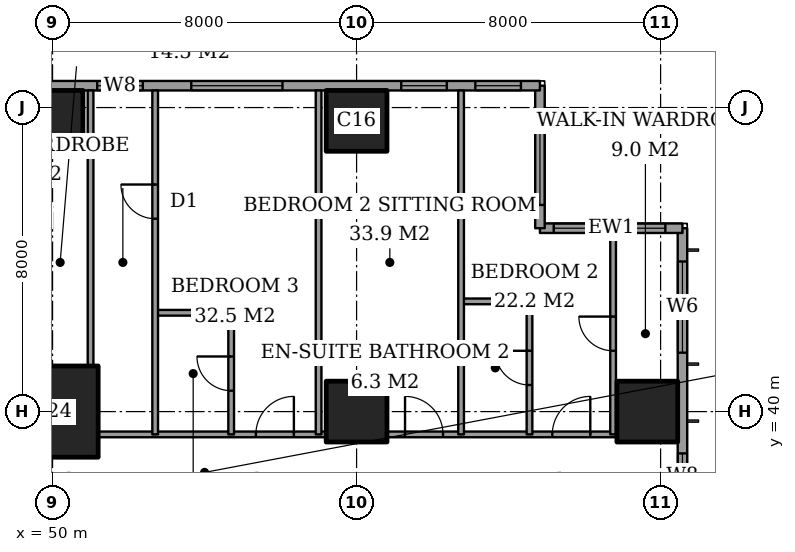
"""IFC4 building model, lengths in metres.
Left out: names, types, materials, properties, quantities, classifications, styles, units other than length and angle.
Written with IfcOpenShell. Run it as: python <this file> out.ifc"""

import sys

from ifc_helpers import new_model, si_unit, direction, frame, frame_2d, origin, origin_2d, place, context, subcontext, project, spatial, rectangle, extrude, element, fill, save


model = new_model("IFC4")
c1 = context("Model", 3, precision=1e-05, world=origin(), true_north=direction((0.0, 1.0)))
c2 = subcontext(c1, "Body", "Model", "MODEL_VIEW")
j1 = project(units=[si_unit("LENGTHUNIT", "METRE"), si_unit("PLANEANGLEUNIT", "RADIAN")], contexts=[c1])
p1 = place(None, origin())
s1 = spatial("IfcSite", under=j1, at=p1, CompositionType="ELEMENT")
p2 = place(p1, origin())
s2 = spatial("IfcBuilding", under=s1, at=p2, CompositionType="ELEMENT")
p3 = place(p2, frame((0.0, 0.0, 255.6)))
s3 = spatial("IfcBuildingStorey", under=s2, at=p3, CompositionType="ELEMENT", Elevation=255.6)
p4 = place(p3, frame((50.0, 40.0, 0.0), z_axis=(0.0, 0.0, 1.0), x_axis=(1.0, 0.0, 0.0)))
e1 = element("IfcColumn", 1, at=p4, inside=s3, PredefinedType="COLUMN", context=c2, shape_type="SweptSolid", body=[
    extrude(rectangle(XDim=2.4, YDim=2.4, at=origin_2d()), origin(), (0.0, 0.0, 1.0), 3.6),
])
for number, where, z_axis, x_axis in (
    (2, (50.0, 47.65, 0.0), (0.0, 0.0, 1.0), (1.0, 0.0, 0.0)),
    (3, (58.0, 40.0, 0.0), (0.0, 0.0, 1.0), (1.0, 0.0, 0.0)),
    (4, (58.0, 47.65, 0.0), (0.0, 0.0, 1.0), (1.0, 0.0, 0.0)),
    (5, (65.65, 40.0, 0.0), (0.0, 0.0, 1.0), (1.0, 0.0, 0.0)),
):
    element("IfcColumn", number, at=place(p3, frame(where, z_axis=z_axis, x_axis=x_axis)), inside=s3, PredefinedType="COLUMN", context=c2, shape_type="SweptSolid", body=[
        extrude(rectangle(XDim=1.6, YDim=1.6, at=origin_2d()), origin(), (0.0, 0.0, 1.0), 3.6),
    ])
p5 = place(p3, frame((66.575, 3.175, 0.0), z_axis=(0.0, 0.0, 1.0), x_axis=(0.0, 1.0, 0.0)))
e6 = element("IfcWall", 6, at=p5, inside=s3, PredefinedType="SOLIDWALL", context=c2, shape_type="SweptSolid", body=[
    extrude(rectangle(XDim=41.65, YDim=0.25, at=frame_2d((20.825, 0.0))), origin(), (0.0, 0.0, 1.0), 3.6),
])
p6 = place(p5, frame((0.875, 0.0, 0.6)))
e7 = element("IfcOpeningElement", 7, at=p6, cuts=e6, PredefinedType="OPENING", context=c2, shape_type="SweptSolid", body=[
    extrude(rectangle(XDim=2.4, YDim=2.0, at=frame_2d((1.2, 1.0))), frame((0.0, 0.135, 0.0), z_axis=(0.0, -1.0, 0.0), x_axis=(1.0, 0.0, 0.0)), (0.0, 0.0, 1.0), 0.27),
])
p7 = place(p5, frame((6.6, 0.0, 0.6)))
e8 = element("IfcOpeningElement", 8, at=p7, cuts=e6, PredefinedType="OPENING", context=c2, shape_type="SweptSolid", body=[
    extrude(rectangle(XDim=1.2, YDim=2.0, at=frame_2d((0.6, 1.0))), frame((0.0, 0.135, 0.0), z_axis=(0.0, -1.0, 0.0), x_axis=(1.0, 0.0, 0.0)), (0.0, 0.0, 1.0), 0.27),
])
p8 = place(p5, frame((8.825, 0.0, 0.6)))
e9 = element("IfcOpeningElement", 9, at=p8, cuts=e6, PredefinedType="OPENING", context=c2, shape_type="SweptSolid", body=[
    extrude(rectangle(XDim=2.4, YDim=2.0, at=frame_2d((1.2, 1.0))), frame((0.0, 0.135, 0.0), z_axis=(0.0, -1.0, 0.0), x_axis=(1.0, 0.0, 0.0)), (0.0, 0.0, 1.0), 0.27),
])
p9 = place(p5, frame((15.725, 0.0, 0.6)))
e10 = element("IfcOpeningElement", 10, at=p9, cuts=e6, PredefinedType="OPENING", context=c2, shape_type="SweptSolid", body=[
    extrude(rectangle(XDim=2.4, YDim=2.0, at=frame_2d((1.2, 1.0))), frame((0.0, 0.135, 0.0), z_axis=(0.0, -1.0, 0.0), x_axis=(1.0, 0.0, 0.0)), (0.0, 0.0, 1.0), 0.27),
])
p10 = place(p5, frame((23.625, 0.0, 0.6)))
e11 = element("IfcOpeningElement", 11, at=p10, cuts=e6, PredefinedType="OPENING", context=c2, shape_type="SweptSolid", body=[
    extrude(rectangle(XDim=2.4, YDim=2.0, at=frame_2d((1.2, 1.0))), frame((0.0, 0.135, 0.0), z_axis=(0.0, -1.0, 0.0), x_axis=(1.0, 0.0, 0.0)), (0.0, 0.0, 1.0), 0.27),
])
p11 = place(p5, frame((30.725, 0.0, 0.6)))
e12 = element("IfcOpeningElement", 12, at=p11, cuts=e6, PredefinedType="OPENING", context=c2, shape_type="SweptSolid", body=[
    extrude(rectangle(XDim=2.4, YDim=2.0, at=frame_2d((1.2, 1.0))), frame((0.0, 0.135, 0.0), z_axis=(0.0, -1.0, 0.0), x_axis=(1.0, 0.0, 0.0)), (0.0, 0.0, 1.0), 0.27),
])
p12 = place(p5, frame((34.525, 0.0, 0.6)))
e13 = element("IfcOpeningElement", 13, at=p12, cuts=e6, PredefinedType="OPENING", context=c2, shape_type="SweptSolid", body=[
    extrude(rectangle(XDim=1.2, YDim=2.0, at=frame_2d((0.6, 1.0))), frame((0.0, 0.135, 0.0), z_axis=(0.0, -1.0, 0.0), x_axis=(1.0, 0.0, 0.0)), (0.0, 0.0, 1.0), 0.27),
])
p13 = place(p5, frame((38.375, 0.0, 0.6)))
e14 = element("IfcOpeningElement", 14, at=p13, cuts=e6, PredefinedType="OPENING", context=c2, shape_type="SweptSolid", body=[
    extrude(rectangle(XDim=2.4, YDim=2.0, at=frame_2d((1.2, 1.0))), frame((0.0, 0.135, 0.0), z_axis=(0.0, -1.0, 0.0), x_axis=(1.0, 0.0, 0.0)), (0.0, 0.0, 1.0), 0.27),
])
p14 = place(p3, frame((66.575, 44.825, 0.0), z_axis=(0.0, 0.0, 1.0), x_axis=(-1.0, 0.0, 0.0)))
e15 = element("IfcWall", 15, at=p14, inside=s3, PredefinedType="SOLIDWALL", context=c2, shape_type="SweptSolid", body=[
    extrude(rectangle(XDim=3.75, YDim=0.25, at=frame_2d((1.875, 0.0))), origin(), (0.0, 0.0, 1.0), 3.6),
])
p15 = place(p14, frame((0.45, 0.0, 0.6)))
e16 = element("IfcOpeningElement", 16, at=p15, cuts=e15, PredefinedType="OPENING", context=c2, shape_type="SweptSolid", body=[
    extrude(rectangle(XDim=1.2, YDim=2.0, at=frame_2d((0.6, 1.0))), frame((0.0, 0.135, 0.0), z_axis=(0.0, -1.0, 0.0), x_axis=(1.0, 0.0, 0.0)), (0.0, 0.0, 1.0), 0.27),
])
p16 = place(p14, frame((2.188, 0.0, 0.6)))
e17 = element("IfcOpeningElement", 17, at=p16, cuts=e15, PredefinedType="OPENING", context=c2, shape_type="SweptSolid", body=[
    extrude(rectangle(XDim=1.2, YDim=2.0, at=frame_2d((0.6, 1.0))), frame((0.0, 0.135, 0.0), z_axis=(0.0, -1.0, 0.0), x_axis=(1.0, 0.0, 0.0)), (0.0, 0.0, 1.0), 0.27),
])
p17 = place(p3, frame((62.825, 44.825, 0.0), z_axis=(0.0, 0.0, 1.0), x_axis=(0.0, 1.0, 0.0)))
e18 = element("IfcWall", 18, at=p17, inside=s3, PredefinedType="SOLIDWALL", context=c2, shape_type="SweptSolid", body=[
    extrude(rectangle(XDim=3.75, YDim=0.25, at=frame_2d((1.875, 0.0))), origin(), (0.0, 0.0, 1.0), 3.6),
])
p18 = place(p17, frame((0.613, 0.0, 0.6)))
e19 = element("IfcOpeningElement", 19, at=p18, cuts=e18, PredefinedType="OPENING", context=c2, shape_type="SweptSolid", body=[
    extrude(rectangle(XDim=2.4, YDim=2.0, at=frame_2d((1.2, 1.0))), frame((0.0, 0.135, 0.0), z_axis=(0.0, -1.0, 0.0), x_axis=(1.0, 0.0, 0.0)), (0.0, 0.0, 1.0), 0.27),
])
p19 = place(p3, frame((62.825, 48.575, 0.0), z_axis=(0.0, 0.0, 1.0), x_axis=(-1.0, 0.0, 0.0)))
e20 = element("IfcWall", 20, at=p19, inside=s3, PredefinedType="SOLIDWALL", context=c2, shape_type="SweptSolid", body=[
    extrude(rectangle(XDim=21.4, YDim=0.25, at=frame_2d((10.7, 0.0))), origin(), (0.0, 0.0, 1.0), 3.6),
])
p20 = place(p19, frame((0.5, 0.0, 0.6)))
e21 = element("IfcOpeningElement", 21, at=p20, cuts=e20, PredefinedType="OPENING", context=c2, shape_type="SweptSolid", body=[
    extrude(rectangle(XDim=1.2, YDim=2.0, at=frame_2d((0.6, 1.0))), frame((0.0, 0.135, 0.0), z_axis=(0.0, -1.0, 0.0), x_axis=(1.0, 0.0, 0.0)), (0.0, 0.0, 1.0), 0.27),
])
p21 = place(p19, frame((2.45, 0.0, 0.6)))
e22 = element("IfcOpeningElement", 22, at=p21, cuts=e20, PredefinedType="OPENING", context=c2, shape_type="SweptSolid", body=[
    extrude(rectangle(XDim=1.2, YDim=2.0, at=frame_2d((0.6, 1.0))), frame((0.0, 0.135, 0.0), z_axis=(0.0, -1.0, 0.0), x_axis=(1.0, 0.0, 0.0)), (0.0, 0.0, 1.0), 0.27),
])
p22 = place(p19, frame((6.775, 0.0, 0.6)))
e23 = element("IfcOpeningElement", 23, at=p22, cuts=e20, PredefinedType="OPENING", context=c2, shape_type="SweptSolid", body=[
    extrude(rectangle(XDim=2.4, YDim=2.0, at=frame_2d((1.2, 1.0))), frame((0.0, 0.135, 0.0), z_axis=(0.0, -1.0, 0.0), x_axis=(1.0, 0.0, 0.0)), (0.0, 0.0, 1.0), 0.27),
])
p23 = place(p19, frame((10.45, 0.0, 0.6)))
e24 = element("IfcOpeningElement", 24, at=p23, cuts=e20, PredefinedType="OPENING", context=c2, shape_type="SweptSolid", body=[
    extrude(rectangle(XDim=1.2, YDim=2.0, at=frame_2d((0.6, 1.0))), frame((0.0, 0.135, 0.0), z_axis=(0.0, -1.0, 0.0), x_axis=(1.0, 0.0, 0.0)), (0.0, 0.0, 1.0), 0.27),
])
p24 = place(p19, frame((14.375, 0.0, 0.6)))
e25 = element("IfcOpeningElement", 25, at=p24, cuts=e20, PredefinedType="OPENING", context=c2, shape_type="SweptSolid", body=[
    extrude(rectangle(XDim=2.4, YDim=2.0, at=frame_2d((1.2, 1.0))), frame((0.0, 0.135, 0.0), z_axis=(0.0, -1.0, 0.0), x_axis=(1.0, 0.0, 0.0)), (0.0, 0.0, 1.0), 0.27),
])
p25 = place(p19, frame((17.9, 0.0, 0.6)))
e26 = element("IfcOpeningElement", 26, at=p25, cuts=e20, PredefinedType="OPENING", context=c2, shape_type="SweptSolid", body=[
    extrude(rectangle(XDim=1.2, YDim=2.0, at=frame_2d((0.6, 1.0))), frame((0.0, 0.135, 0.0), z_axis=(0.0, -1.0, 0.0), x_axis=(1.0, 0.0, 0.0)), (0.0, 0.0, 1.0), 0.27),
])
p26 = place(p3, frame((51.2, 39.4, 0.0), z_axis=(0.0, 0.0, 1.0), x_axis=(1.0, 0.0, 0.0)))
e27 = element("IfcWall", 27, at=p26, inside=s3, PredefinedType="PARTITIONING", context=c2, shape_type="SweptSolid", body=[
    extrude(rectangle(XDim=6.0, YDim=0.15, at=frame_2d((3.0, 0.0))), origin(), (0.0, 0.0, 1.0), 3.35),
])
p27 = place(p26, frame((4.15, 0.0, 0.0)))
e28 = element("IfcOpeningElement", 28, at=p27, cuts=e27, PredefinedType="OPENING", context=c2, shape_type="SweptSolid", body=[
    extrude(rectangle(XDim=1.0, YDim=2.1, at=frame_2d((0.5, 1.05))), frame((0.0, 0.085, 0.0), z_axis=(0.0, -1.0, 0.0), x_axis=(1.0, 0.0, 0.0)), (0.0, 0.0, 1.0), 0.17),
])
p28 = place(p3, frame((58.8, 39.4, 0.0), z_axis=(0.0, 0.0, 1.0), x_axis=(1.0, 0.0, 0.0)))
e29 = element("IfcWall", 29, at=p28, inside=s3, PredefinedType="PARTITIONING", context=c2, shape_type="SweptSolid", body=[
    extrude(rectangle(XDim=6.05, YDim=0.15, at=frame_2d((3.025, 0.0))), origin(), (0.0, 0.0, 1.0), 3.35),
])
p29 = place(p28, frame((4.35, 0.0, 0.0)))
e30 = element("IfcOpeningElement", 30, at=p29, cuts=e29, PredefinedType="OPENING", context=c2, shape_type="SweptSolid", body=[
    extrude(rectangle(XDim=1.0, YDim=2.1, at=frame_2d((0.5, 1.05))), frame((0.0, 0.085, 0.0), z_axis=(0.0, -1.0, 0.0), x_axis=(1.0, 0.0, 0.0)), (0.0, 0.0, 1.0), 0.17),
])
p30 = place(p28, frame((0.475, 0.0, 0.0)))
e31 = element("IfcOpeningElement", 31, at=p30, cuts=e29, PredefinedType="OPENING", context=c2, shape_type="SweptSolid", body=[
    extrude(rectangle(XDim=1.0, YDim=2.1, at=frame_2d((0.5, 1.05))), frame((0.0, 0.085, 0.0), z_axis=(0.0, -1.0, 0.0), x_axis=(1.0, 0.0, 0.0)), (0.0, 0.0, 1.0), 0.17),
])
p31 = place(p3, frame((52.7, 42.6, 0.0), z_axis=(0.0, 0.0, 1.0), x_axis=(1.0, 0.0, 0.0)))
e32 = element("IfcWall", 32, at=p31, inside=s3, PredefinedType="PARTITIONING", context=c2, shape_type="SweptSolid", body=[
    extrude(rectangle(XDim=2.0, YDim=0.15, at=frame_2d((1.0, 0.0))), origin(), (0.0, 0.0, 1.0), 3.35),
])
p32 = place(p3, frame((60.75, 42.9, 0.0), z_axis=(0.0, 0.0, 1.0), x_axis=(1.0, 0.0, 0.0)))
e33 = element("IfcWall", 33, at=p32, inside=s3, PredefinedType="PARTITIONING", context=c2, shape_type="SweptSolid", body=[
    extrude(rectangle(XDim=1.8, YDim=0.15, at=frame_2d((0.9, 0.0))), origin(), (0.0, 0.0, 1.0), 3.35),
])
p33 = place(p3, frame((51.0, 41.2, 0.0), z_axis=(0.0, 0.0, 1.0), x_axis=(0.0, 1.0, 0.0)))
e34 = element("IfcWall", 34, at=p33, inside=s3, PredefinedType="PARTITIONING", context=c2, shape_type="SweptSolid", body=[
    extrude(rectangle(XDim=7.25, YDim=0.15, at=frame_2d((3.625, 0.0))), origin(), (0.0, 0.0, 1.0), 3.35),
])
p34 = place(p3, frame((52.7, 39.4, 0.0), z_axis=(0.0, 0.0, 1.0), x_axis=(0.0, 1.0, 0.0)))
e35 = element("IfcWall", 35, at=p34, inside=s3, PredefinedType="PARTITIONING", context=c2, shape_type="SweptSolid", body=[
    extrude(rectangle(XDim=9.05, YDim=0.15, at=frame_2d((4.525, 0.0))), origin(), (0.0, 0.0, 1.0), 3.35),
])
p35 = place(p34, frame((5.675, 0.0, 0.0)))
e36 = element("IfcOpeningElement", 36, at=p35, cuts=e35, PredefinedType="OPENING", context=c2, shape_type="SweptSolid", body=[
    extrude(rectangle(XDim=0.9, YDim=2.1, at=frame_2d((0.45, 1.05))), frame((0.0, 0.085, 0.0), z_axis=(0.0, -1.0, 0.0), x_axis=(1.0, 0.0, 0.0)), (0.0, 0.0, 1.0), 0.17),
])
p36 = place(p3, frame((54.7, 39.4, 0.0), z_axis=(0.0, 0.0, 1.0), x_axis=(0.0, 1.0, 0.0)))
e37 = element("IfcWall", 37, at=p36, inside=s3, PredefinedType="PARTITIONING", context=c2, shape_type="SweptSolid", body=[
    extrude(rectangle(XDim=3.2, YDim=0.15, at=frame_2d((1.6, 0.0))), origin(), (0.0, 0.0, 1.0), 3.35),
])
p37 = place(p36, frame((1.15, 0.0, 0.0)))
e38 = element("IfcOpeningElement", 38, at=p37, cuts=e37, PredefinedType="OPENING", context=c2, shape_type="SweptSolid", body=[
    extrude(rectangle(XDim=0.9, YDim=2.1, at=frame_2d((0.45, 1.05))), frame((0.0, 0.085, 0.0), z_axis=(0.0, -1.0, 0.0), x_axis=(1.0, 0.0, 0.0)), (0.0, 0.0, 1.0), 0.17),
])
for number, where, z_axis, x_axis in (
    (39, (57.0, 39.4, 0.0), (0.0, 0.0, 1.0), (0.0, 1.0, 0.0)),
    (40, (60.75, 39.4, 0.0), (0.0, 0.0, 1.0), (0.0, 1.0, 0.0)),
):
    element("IfcWall", number, at=place(p3, frame(where, z_axis=z_axis, x_axis=x_axis)), inside=s3, PredefinedType="PARTITIONING", context=c2, shape_type="SweptSolid", body=[
        extrude(rectangle(XDim=9.05, YDim=0.15, at=frame_2d((4.525, 0.0))), origin(), (0.0, 0.0, 1.0), 3.35),
    ])
p38 = place(p3, frame((62.55, 39.4, 0.0), z_axis=(0.0, 0.0, 1.0), x_axis=(0.0, 1.0, 0.0)))
e41 = element("IfcWall", 41, at=p38, inside=s3, PredefinedType="PARTITIONING", context=c2, shape_type="SweptSolid", body=[
    extrude(rectangle(XDim=3.5, YDim=0.15, at=frame_2d((1.75, 0.0))), origin(), (0.0, 0.0, 1.0), 3.35),
])
p39 = place(p38, frame((1.3, 0.0, 0.0)))
e42 = element("IfcOpeningElement", 42, at=p39, cuts=e41, PredefinedType="OPENING", context=c2, shape_type="SweptSolid", body=[
    extrude(rectangle(XDim=0.9, YDim=2.1, at=frame_2d((0.45, 1.05))), frame((0.0, 0.085, 0.0), z_axis=(0.0, -1.0, 0.0), x_axis=(1.0, 0.0, 0.0)), (0.0, 0.0, 1.0), 0.17),
])
p40 = place(p3, frame((64.75, 39.4, 0.0), z_axis=(0.0, 0.0, 1.0), x_axis=(0.0, 1.0, 0.0)))
e43 = element("IfcWall", 43, at=p40, inside=s3, PredefinedType="PARTITIONING", context=c2, shape_type="SweptSolid", body=[
    extrude(rectangle(XDim=5.3, YDim=0.15, at=frame_2d((2.65, 0.0))), origin(), (0.0, 0.0, 1.0), 3.35),
])
p41 = place(p40, frame((2.2, 0.0, 0.0)))
e44 = element("IfcOpeningElement", 44, at=p41, cuts=e43, PredefinedType="OPENING", context=c2, shape_type="SweptSolid", body=[
    extrude(rectangle(XDim=0.9, YDim=2.1, at=frame_2d((0.45, 1.05))), frame((0.0, 0.085, 0.0), z_axis=(0.0, -1.0, 0.0), x_axis=(1.0, 0.0, 0.0)), (0.0, 0.0, 1.0), 0.17),
])
p42 = place(p12, origin())
e45 = element("IfcWindow", 45, at=p42, inside=s3, PartitioningType="SINGLE_PANEL", PredefinedType="WINDOW", context=c2, shape_type="SweptSolid", body=[
    extrude(rectangle(XDim=1.2, YDim=2.0, at=frame_2d((0.6, 1.0))), frame((0.0, 0.03, 0.0), z_axis=(0.0, -1.0, 0.0), x_axis=(1.0, 0.0, 0.0)), (0.0, 0.0, 1.0), 0.06),
])
fill(e13, e45)
p43 = place(p13, origin())
e46 = element("IfcWindow", 46, at=p43, inside=s3, PartitioningType="SINGLE_PANEL", PredefinedType="WINDOW", context=c2, shape_type="SweptSolid", body=[
    extrude(rectangle(XDim=2.4, YDim=2.0, at=frame_2d((1.2, 1.0))), frame((0.0, 0.03, 0.0), z_axis=(0.0, -1.0, 0.0), x_axis=(1.0, 0.0, 0.0)), (0.0, 0.0, 1.0), 0.06),
])
fill(e14, e46)
p44 = place(p15, origin())
e47 = element("IfcWindow", 47, at=p44, inside=s3, PartitioningType="SINGLE_PANEL", PredefinedType="WINDOW", context=c2, shape_type="SweptSolid", body=[
    extrude(rectangle(XDim=1.2, YDim=2.0, at=frame_2d((0.6, 1.0))), frame((0.0, 0.03, 0.0), z_axis=(0.0, -1.0, 0.0), x_axis=(1.0, 0.0, 0.0)), (0.0, 0.0, 1.0), 0.06),
])
fill(e16, e47)
p45 = place(p16, origin())
e48 = element("IfcWindow", 48, at=p45, inside=s3, PartitioningType="SINGLE_PANEL", PredefinedType="WINDOW", context=c2, shape_type="SweptSolid", body=[
    extrude(rectangle(XDim=1.2, YDim=2.0, at=frame_2d((0.6, 1.0))), frame((0.0, 0.03, 0.0), z_axis=(0.0, -1.0, 0.0), x_axis=(1.0, 0.0, 0.0)), (0.0, 0.0, 1.0), 0.06),
])
fill(e17, e48)
p46 = place(p18, origin())
e49 = element("IfcWindow", 49, at=p46, inside=s3, PartitioningType="SINGLE_PANEL", PredefinedType="WINDOW", context=c2, shape_type="SweptSolid", body=[
    extrude(rectangle(XDim=2.4, YDim=2.0, at=frame_2d((1.2, 1.0))), frame((0.0, 0.03, 0.0), z_axis=(0.0, -1.0, 0.0), x_axis=(1.0, 0.0, 0.0)), (0.0, 0.0, 1.0), 0.06),
])
fill(e19, e49)
p47 = place(p20, origin())
e50 = element("IfcWindow", 50, at=p47, inside=s3, PartitioningType="SINGLE_PANEL", PredefinedType="WINDOW", context=c2, shape_type="SweptSolid", body=[
    extrude(rectangle(XDim=1.2, YDim=2.0, at=frame_2d((0.6, 1.0))), frame((0.0, 0.03, 0.0), z_axis=(0.0, -1.0, 0.0), x_axis=(1.0, 0.0, 0.0)), (0.0, 0.0, 1.0), 0.06),
])
fill(e21, e50)
p48 = place(p21, origin())
e51 = element("IfcWindow", 51, at=p48, inside=s3, PartitioningType="SINGLE_PANEL", PredefinedType="WINDOW", context=c2, shape_type="SweptSolid", body=[
    extrude(rectangle(XDim=1.2, YDim=2.0, at=frame_2d((0.6, 1.0))), frame((0.0, 0.03, 0.0), z_axis=(0.0, -1.0, 0.0), x_axis=(1.0, 0.0, 0.0)), (0.0, 0.0, 1.0), 0.06),
])
fill(e22, e51)
p49 = place(p22, origin())
e52 = element("IfcWindow", 52, at=p49, inside=s3, PartitioningType="SINGLE_PANEL", PredefinedType="WINDOW", context=c2, shape_type="SweptSolid", body=[
    extrude(rectangle(XDim=2.4, YDim=2.0, at=frame_2d((1.2, 1.0))), frame((0.0, 0.03, 0.0), z_axis=(0.0, -1.0, 0.0), x_axis=(1.0, 0.0, 0.0)), (0.0, 0.0, 1.0), 0.06),
])
fill(e23, e52)
p50 = place(p23, origin())
e53 = element("IfcWindow", 53, at=p50, inside=s3, PartitioningType="SINGLE_PANEL", PredefinedType="WINDOW", context=c2, shape_type="SweptSolid", body=[
    extrude(rectangle(XDim=1.2, YDim=2.0, at=frame_2d((0.6, 1.0))), frame((0.0, 0.03, 0.0), z_axis=(0.0, -1.0, 0.0), x_axis=(1.0, 0.0, 0.0)), (0.0, 0.0, 1.0), 0.06),
])
fill(e24, e53)
p51 = place(p41, origin())
e54 = element("IfcDoor", 54, at=p51, inside=s3, OperationType="SINGLE_SWING_LEFT", PredefinedType="DOOR", context=c2, shape_type="SweptSolid", body=[
    extrude(rectangle(XDim=0.9, YDim=2.1, at=frame_2d((0.45, 1.05))), frame((0.0, 0.025, 0.0), z_axis=(0.0, -1.0, 0.0), x_axis=(1.0, 0.0, 0.0)), (0.0, 0.0, 1.0), 0.05),
])
fill(e44, e54)
p52 = place(p39, origin())
e55 = element("IfcDoor", 55, at=p52, inside=s3, OperationType="SINGLE_SWING_LEFT", PredefinedType="DOOR", context=c2, shape_type="SweptSolid", body=[
    extrude(rectangle(XDim=0.9, YDim=2.1, at=frame_2d((0.45, 1.05))), frame((0.0, 0.025, 0.0), z_axis=(0.0, -1.0, 0.0), x_axis=(1.0, 0.0, 0.0)), (0.0, 0.0, 1.0), 0.05),
])
fill(e42, e55)
p53 = place(p29, origin())
e56 = element("IfcDoor", 56, at=p53, inside=s3, OperationType="SINGLE_SWING_LEFT", PredefinedType="DOOR", context=c2, shape_type="SweptSolid", body=[
    extrude(rectangle(XDim=1.0, YDim=2.1, at=frame_2d((0.5, 1.05))), frame((0.0, 0.025, 0.0), z_axis=(0.0, -1.0, 0.0), x_axis=(1.0, 0.0, 0.0)), (0.0, 0.0, 1.0), 0.05),
])
fill(e30, e56)
p54 = place(p30, origin())
e57 = element("IfcDoor", 57, at=p54, inside=s3, OperationType="SINGLE_SWING_RIGHT", PredefinedType="DOOR", context=c2, shape_type="SweptSolid", body=[
    extrude(rectangle(XDim=1.0, YDim=2.1, at=frame_2d((0.5, 1.05))), frame((0.0, 0.025, 0.0), z_axis=(0.0, -1.0, 0.0), x_axis=(1.0, 0.0, 0.0)), (0.0, 0.0, 1.0), 0.05),
])
fill(e31, e57)
p55 = place(p37, origin())
e58 = element("IfcDoor", 58, at=p55, inside=s3, OperationType="SINGLE_SWING_LEFT", PredefinedType="DOOR", context=c2, shape_type="SweptSolid", body=[
    extrude(rectangle(XDim=0.9, YDim=2.1, at=frame_2d((0.45, 1.05))), frame((0.0, 0.025, 0.0), z_axis=(0.0, -1.0, 0.0), x_axis=(1.0, 0.0, 0.0)), (0.0, 0.0, 1.0), 0.05),
])
fill(e38, e58)
p56 = place(p27, origin())
e59 = element("IfcDoor", 59, at=p56, inside=s3, OperationType="SINGLE_SWING_LEFT", PredefinedType="DOOR", context=c2, shape_type="SweptSolid", body=[
    extrude(rectangle(XDim=1.0, YDim=2.1, at=frame_2d((0.5, 1.05))), frame((0.0, 0.025, 0.0), z_axis=(0.0, -1.0, 0.0), x_axis=(1.0, 0.0, 0.0)), (0.0, 0.0, 1.0), 0.05),
])
fill(e28, e59)
p57 = place(p35, origin())
e60 = element("IfcDoor", 60, at=p57, inside=s3, OperationType="SINGLE_SWING_LEFT", PredefinedType="DOOR", context=c2, shape_type="SweptSolid", body=[
    extrude(rectangle(XDim=0.9, YDim=2.1, at=frame_2d((0.45, 1.05))), frame((0.0, 0.025, 0.0), z_axis=(0.0, -1.0, 0.0), x_axis=(1.0, 0.0, 0.0)), (0.0, 0.0, 1.0), 0.05),
])
fill(e36, e60)
save(model, sys.argv[1])
